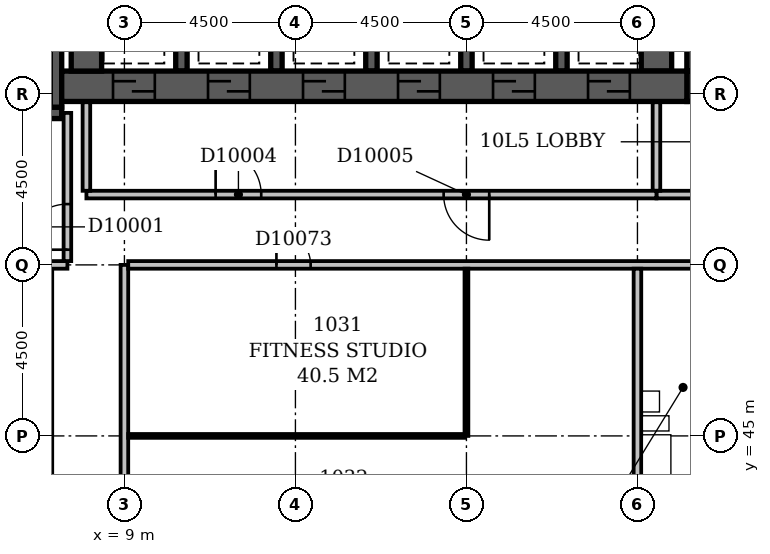
"""IFC4 building model, lengths in metres.
Left out: names, types, materials, properties, quantities, classifications, styles, units other than length and angle.
Written with IfcOpenShell. Run it as: python <this file> out.ifc"""

import sys

from ifc_helpers import new_model, si_unit, direction, frame, frame_2d, origin, place, context, subcontext, project, spatial, rectangle, extrude, element, fill, save


model = new_model("IFC4")
c1 = context("Model", 3, precision=1e-05, world=origin(), true_north=direction((0.0, 1.0)))
c2 = subcontext(c1, "Body", "Model", "MODEL_VIEW")
j1 = project(units=[si_unit("LENGTHUNIT", "METRE"), si_unit("PLANEANGLEUNIT", "RADIAN")], contexts=[c1])
p1 = place(None, origin())
s1 = spatial("IfcSite", under=j1, at=p1, CompositionType="ELEMENT")
p2 = place(p1, origin())
s2 = spatial("IfcBuilding", under=s1, at=p2, CompositionType="ELEMENT")
p3 = place(p2, frame((0.0, 0.0, 47.0)))
s3 = spatial("IfcBuildingStorey", under=s2, at=p3, CompositionType="ELEMENT", Elevation=47.0)
p4 = place(p3, frame((0.35, 53.5, -0.3), z_axis=(0.0, 0.0, 1.0), x_axis=(1.0, 0.0, 0.0)))
e1 = element("IfcWall", 1, at=p4, inside=s3, PredefinedType="SHEAR", context=c2, shape_type="SweptSolid", body=[
    extrude(rectangle(XDim=7.0, YDim=0.3, at=frame_2d((3.5, 0.0))), origin(), (0.0, 0.0, 1.0), 3.6),
])
p5 = place(p4, frame((5.58, 0.0, 0.3)))
e2 = element("IfcOpeningElement", 2, at=p5, cuts=e1, PredefinedType="OPENING", context=c2, shape_type="SweptSolid", body=[
    extrude(rectangle(XDim=1.1, YDim=2.1, at=frame_2d((0.55, 1.05))), frame((0.0, 0.162, 0.0), z_axis=(0.0, -1.0, 0.0), x_axis=(1.0, 0.0, 0.0)), (0.0, 0.0, 1.0), 0.324),
])
p6 = place(p3, frame((7.2, 53.65, -0.3), z_axis=(0.0, 0.0, 1.0), x_axis=(0.0, 1.0, 0.0)))
e3 = element("IfcWall", 3, at=p6, inside=s3, PredefinedType="SHEAR", context=c2, shape_type="SweptSolid", body=[
    extrude(rectangle(XDim=4.2, YDim=0.3, at=frame_2d((2.1, 0.0))), origin(), (0.0, 0.0, 1.0), 3.6),
])
p7 = place(p3, frame((7.35, 54.2, -0.3), z_axis=(0.0, 0.0, 1.0), x_axis=(1.0, 0.0, 0.0)))
e4 = element("IfcWall", 4, at=p7, inside=s3, PredefinedType="SHEAR", context=c2, shape_type="SweptSolid", body=[
    extrude(rectangle(XDim=16.45, YDim=0.8, at=frame_2d((8.225, 0.0))), origin(), (0.0, 0.0, 1.0), 3.6),
])
p8 = place(p7, frame((1.35, 0.0, 0.3)))
e5 = element("IfcOpeningElement", 5, at=p8, cuts=e4, PredefinedType="OPENING", context=c2, shape_type="SweptSolid", body=[
    extrude(rectangle(XDim=1.1, YDim=2.1, at=frame_2d((0.55, 1.05))), frame((0.0, 0.412, 0.0), z_axis=(0.0, -1.0, 0.0), x_axis=(1.0, 0.0, 0.0)), (0.0, 0.0, 1.0), 0.824),
])
p9 = place(p7, frame((3.85, 0.0, 0.3)))
e6 = element("IfcOpeningElement", 6, at=p9, cuts=e4, PredefinedType="OPENING", context=c2, shape_type="SweptSolid", body=[
    extrude(rectangle(XDim=1.1, YDim=2.1, at=frame_2d((0.55, 1.05))), frame((0.0, 0.412, 0.0), z_axis=(0.0, -1.0, 0.0), x_axis=(1.0, 0.0, 0.0)), (0.0, 0.0, 1.0), 0.824),
])
p10 = place(p7, frame((6.35, 0.0, 0.3)))
e7 = element("IfcOpeningElement", 7, at=p10, cuts=e4, PredefinedType="OPENING", context=c2, shape_type="SweptSolid", body=[
    extrude(rectangle(XDim=1.1, YDim=2.1, at=frame_2d((0.55, 1.05))), frame((0.0, 0.412, 0.0), z_axis=(0.0, -1.0, 0.0), x_axis=(1.0, 0.0, 0.0)), (0.0, 0.0, 1.0), 0.824),
])
p11 = place(p7, frame((8.85, 0.0, 0.3)))
e8 = element("IfcOpeningElement", 8, at=p11, cuts=e4, PredefinedType="OPENING", context=c2, shape_type="SweptSolid", body=[
    extrude(rectangle(XDim=1.1, YDim=2.1, at=frame_2d((0.55, 1.05))), frame((0.0, 0.412, 0.0), z_axis=(0.0, -1.0, 0.0), x_axis=(1.0, 0.0, 0.0)), (0.0, 0.0, 1.0), 0.824),
])
p12 = place(p7, frame((11.35, 0.0, 0.3)))
e9 = element("IfcOpeningElement", 9, at=p12, cuts=e4, PredefinedType="OPENING", context=c2, shape_type="SweptSolid", body=[
    extrude(rectangle(XDim=1.1, YDim=2.1, at=frame_2d((0.55, 1.05))), frame((0.0, 0.412, 0.0), z_axis=(0.0, -1.0, 0.0), x_axis=(1.0, 0.0, 0.0)), (0.0, 0.0, 1.0), 0.824),
])
p13 = place(p7, frame((13.85, 0.0, 0.3)))
e10 = element("IfcOpeningElement", 10, at=p13, cuts=e4, PredefinedType="OPENING", context=c2, shape_type="SweptSolid", body=[
    extrude(rectangle(XDim=1.1, YDim=2.1, at=frame_2d((0.55, 1.05))), frame((0.0, 0.412, 0.0), z_axis=(0.0, -1.0, 0.0), x_axis=(1.0, 0.0, 0.0)), (0.0, 0.0, 1.0), 0.824),
])
p14 = place(p3, frame((8.0, 54.6, -0.3), z_axis=(0.0, 0.0, 1.0), x_axis=(0.0, 1.0, 0.0)))
e11 = element("IfcWall", 11, at=p14, inside=s3, PredefinedType="SHEAR", context=c2, shape_type="SweptSolid", body=[
    extrude(rectangle(XDim=3.0, YDim=0.8, at=frame_2d((1.5, 0.0))), origin(), (0.0, 0.0, 1.0), 3.6),
])
for number, where, z_axis, x_axis in (
    (12, (10.5, 54.6, -0.3), (0.0, 0.0, 1.0), (0.0, 1.0, 0.0)),
    (13, (13.0, 54.6, -0.3), (0.0, 0.0, 1.0), (0.0, 1.0, 0.0)),
    (14, (15.5, 54.6, -0.3), (0.0, 0.0, 1.0), (0.0, 1.0, 0.0)),
    (15, (18.0, 54.6, -0.3), (0.0, 0.0, 1.0), (0.0, 1.0, 0.0)),
    (16, (20.5, 54.6, -0.3), (0.0, 0.0, 1.0), (0.0, 1.0, 0.0)),
):
    element("IfcWall", number, at=place(p3, frame(where, z_axis=z_axis, x_axis=x_axis)), inside=s3, PredefinedType="SHEAR", context=c2, shape_type="SweptSolid", body=[
        extrude(rectangle(XDim=3.0, YDim=0.3, at=frame_2d((1.5, 0.0))), origin(), (0.0, 0.0, 1.0), 3.6),
    ])
p15 = place(p3, frame((23.0, 54.6, -0.3), z_axis=(0.0, 0.0, 1.0), x_axis=(0.0, 1.0, 0.0)))
e17 = element("IfcWall", 17, at=p15, inside=s3, PredefinedType="SHEAR", context=c2, shape_type="SweptSolid", body=[
    extrude(rectangle(XDim=3.0, YDim=0.8, at=frame_2d((1.5, 0.0))), origin(), (0.0, 0.0, 1.0), 3.6),
])
p16 = place(p3, frame((23.8, 54.2, -0.3), z_axis=(0.0, 0.0, 1.0), x_axis=(1.0, 0.0, 0.0)))
e18 = element("IfcWall", 18, at=p16, inside=s3, PredefinedType="SHEAR", context=c2, shape_type="SweptSolid", body=[
    extrude(rectangle(XDim=3.3, YDim=0.8, at=frame_2d((1.65, 0.0))), origin(), (0.0, 0.0, 1.0), 3.6),
])
p17 = place(p16, frame((1.1, 0.0, 0.3)))
e19 = element("IfcOpeningElement", 19, at=p17, cuts=e18, PredefinedType="OPENING", context=c2, shape_type="SweptSolid", body=[
    extrude(rectangle(XDim=1.1, YDim=2.1, at=frame_2d((0.55, 1.05))), frame((0.0, 0.412, 0.0), z_axis=(0.0, -1.0, 0.0), x_axis=(1.0, 0.0, 0.0)), (0.0, 0.0, 1.0), 0.824),
])
p18 = place(p3, frame((24.2, 54.6, -0.3), z_axis=(0.0, 0.0, 1.0), x_axis=(0.0, 1.0, 0.0)))
e20 = element("IfcWall", 20, at=p18, inside=s3, PredefinedType="SHEAR", context=c2, shape_type="SweptSolid", body=[
    extrude(rectangle(XDim=3.0, YDim=0.8, at=frame_2d((1.5, 0.0))), origin(), (0.0, 0.0, 1.0), 3.6),
])
p19 = place(p3, frame((8.0, 51.35, 0.0), z_axis=(0.0, 0.0, 1.0), x_axis=(1.0, 0.0, 0.0)))
e21 = element("IfcWall", 21, at=p19, inside=s3, PredefinedType="PARTITIONING", context=c2, shape_type="SweptSolid", body=[
    extrude(rectangle(XDim=15.0, YDim=0.2, at=frame_2d((7.5, 0.0))), origin(), (0.0, 0.0, 1.0), 3.3),
])
p20 = place(p19, frame((3.4, 0.0, 0.0)))
e22 = element("IfcOpeningElement", 22, at=p20, cuts=e21, PredefinedType="OPENING", context=c2, shape_type="SweptSolid", body=[
    extrude(rectangle(XDim=1.2, YDim=2.1, at=frame_2d((0.6, 1.05))), frame((0.0, 0.112, 0.0), z_axis=(0.0, -1.0, 0.0), x_axis=(1.0, 0.0, 0.0)), (0.0, 0.0, 1.0), 0.224),
])
p21 = place(p19, frame((9.4, 0.0, 0.0)))
e23 = element("IfcOpeningElement", 23, at=p21, cuts=e21, PredefinedType="OPENING", context=c2, shape_type="SweptSolid", body=[
    extrude(rectangle(XDim=1.2, YDim=2.1, at=frame_2d((0.6, 1.05))), frame((0.0, 0.112, 0.0), z_axis=(0.0, -1.0, 0.0), x_axis=(1.0, 0.0, 0.0)), (0.0, 0.0, 1.0), 0.224),
])
for number, where, z_axis, x_axis in (
    (24, (23.0, 51.45, 0.0), (0.0, 0.0, 1.0), (0.0, 1.0, 0.0)),
    (25, (8.0, 51.45, 0.0), (0.0, 0.0, 1.0), (0.0, 1.0, 0.0)),
):
    element("IfcWall", number, at=place(p3, frame(where, z_axis=z_axis, x_axis=x_axis)), inside=s3, PredefinedType="PARTITIONING", context=c2, shape_type="SweptSolid", body=[
        extrude(rectangle(XDim=2.33, YDim=0.2, at=frame_2d((1.165, 0.0))), origin(), (0.0, 0.0, 1.0), 3.3),
    ])
p22 = place(p3, frame((23.0, 51.35, 0.0), z_axis=(0.0, 0.0, 1.0), x_axis=(1.0, 0.0, 0.0)))
e26 = element("IfcWall", 26, at=p22, inside=s3, PredefinedType="PARTITIONING", context=c2, shape_type="SweptSolid", body=[
    extrude(rectangle(XDim=4.8, YDim=0.2, at=frame_2d((2.4, 0.0))), origin(), (0.0, 0.0, 1.0), 3.3),
])
p23 = place(p22, frame((1.65, 0.0, 0.0)))
e27 = element("IfcOpeningElement", 27, at=p23, cuts=e26, PredefinedType="OPENING", context=c2, shape_type="SweptSolid", body=[
    extrude(rectangle(XDim=1.2, YDim=2.1, at=frame_2d((0.6, 1.05))), frame((0.0, 0.112, 0.0), z_axis=(0.0, -1.0, 0.0), x_axis=(1.0, 0.0, 0.0)), (0.0, 0.0, 1.0), 0.224),
])
p24 = place(p3, frame((0.5, 49.5, 0.0), z_axis=(0.0, 0.0, 1.0), x_axis=(1.0, 0.0, 0.0)))
e28 = element("IfcWall", 28, at=p24, inside=s3, PredefinedType="PARTITIONING", context=c2, shape_type="SweptSolid", body=[
    extrude(rectangle(XDim=7.0, YDim=0.2, at=frame_2d((3.5, 0.0))), origin(), (0.0, 0.0, 1.0), 3.3),
])
p25 = place(p3, frame((7.5, 49.6, 0.0), z_axis=(0.0, 0.0, 1.0), x_axis=(0.0, 1.0, 0.0)))
e29 = element("IfcWall", 29, at=p25, inside=s3, PredefinedType="PARTITIONING", context=c2, shape_type="SweptSolid", body=[
    extrude(rectangle(XDim=3.9, YDim=0.2, at=frame_2d((1.95, 0.0))), origin(), (0.0, 0.0, 1.0), 3.3),
])
p26 = place(p25, frame((0.3, 0.0, 0.0)))
e30 = element("IfcOpeningElement", 30, at=p26, cuts=e29, PredefinedType="OPENING", context=c2, shape_type="SweptSolid", body=[
    extrude(rectangle(XDim=1.2, YDim=2.1, at=frame_2d((0.6, 1.05))), frame((0.0, 0.112, 0.0), z_axis=(0.0, -1.0, 0.0), x_axis=(1.0, 0.0, 0.0)), (0.0, 0.0, 1.0), 0.224),
])
p27 = place(p3, frame((9.0, 5.0, 0.0), z_axis=(0.0, 0.0, 1.0), x_axis=(0.0, 1.0, 0.0)))
e31 = element("IfcWall", 31, at=p27, inside=s3, PredefinedType="PARTITIONING", context=c2, shape_type="SweptSolid", body=[
    extrude(rectangle(XDim=44.5, YDim=0.2, at=frame_2d((22.25, 0.0))), origin(), (0.0, 0.0, 1.0), 3.3),
])
p28 = place(p27, frame((28.45, 0.0, 0.0)))
e32 = element("IfcOpeningElement", 32, at=p28, cuts=e31, PredefinedType="OPENING", context=c2, shape_type="SweptSolid", body=[
    extrude(rectangle(XDim=1.0, YDim=2.1, at=frame_2d((0.5, 1.05))), frame((0.0, 0.112, 0.0), z_axis=(0.0, -1.0, 0.0), x_axis=(1.0, 0.0, 0.0)), (0.0, 0.0, 1.0), 0.224),
])
p29 = place(p27, frame((17.8, 0.0, 0.0)))
e33 = element("IfcOpeningElement", 33, at=p29, cuts=e31, PredefinedType="OPENING", context=c2, shape_type="SweptSolid", body=[
    extrude(rectangle(XDim=1.0, YDim=2.1, at=frame_2d((0.5, 1.05))), frame((0.0, 0.112, 0.0), z_axis=(0.0, -1.0, 0.0), x_axis=(1.0, 0.0, 0.0)), (0.0, 0.0, 1.0), 0.224),
])
p30 = place(p27, frame((14.55, 0.0, 0.0)))
e34 = element("IfcOpeningElement", 34, at=p30, cuts=e31, PredefinedType="OPENING", context=c2, shape_type="SweptSolid", body=[
    extrude(rectangle(XDim=1.0, YDim=2.1, at=frame_2d((0.5, 1.05))), frame((0.0, 0.112, 0.0), z_axis=(0.0, -1.0, 0.0), x_axis=(1.0, 0.0, 0.0)), (0.0, 0.0, 1.0), 0.224),
])
p31 = place(p27, frame((11.7, 0.0, 0.0)))
e35 = element("IfcOpeningElement", 35, at=p31, cuts=e31, PredefinedType="OPENING", context=c2, shape_type="SweptSolid", body=[
    extrude(rectangle(XDim=1.0, YDim=2.1, at=frame_2d((0.5, 1.05))), frame((0.0, 0.112, 0.0), z_axis=(0.0, -1.0, 0.0), x_axis=(1.0, 0.0, 0.0)), (0.0, 0.0, 1.0), 0.224),
])
p32 = place(p27, frame((35.0, 0.0, 0.0)))
e36 = element("IfcOpeningElement", 36, at=p32, cuts=e31, PredefinedType="OPENING", context=c2, shape_type="SweptSolid", body=[
    extrude(rectangle(XDim=0.9, YDim=2.1, at=frame_2d((0.45, 1.05))), frame((0.0, 0.112, 0.0), z_axis=(0.0, -1.0, 0.0), x_axis=(1.0, 0.0, 0.0)), (0.0, 0.0, 1.0), 0.224),
])
p33 = place(p27, frame((1.5, 0.0, 0.0)))
e37 = element("IfcOpeningElement", 37, at=p33, cuts=e31, PredefinedType="OPENING", context=c2, shape_type="SweptSolid", body=[
    extrude(rectangle(XDim=0.9, YDim=2.1, at=frame_2d((0.45, 1.05))), frame((0.0, 0.112, 0.0), z_axis=(0.0, -1.0, 0.0), x_axis=(1.0, 0.0, 0.0)), (0.0, 0.0, 1.0), 0.224),
])
p34 = place(p3, frame((22.5, 36.6, 0.0), z_axis=(0.0, 0.0, 1.0), x_axis=(0.0, 1.0, 0.0)))
e38 = element("IfcWall", 38, at=p34, inside=s3, PredefinedType="PARTITIONING", context=c2, shape_type="SweptSolid", body=[
    extrude(rectangle(XDim=12.8, YDim=0.2, at=frame_2d((6.4, 0.0))), origin(), (0.0, 0.0, 1.0), 3.3),
])
p35 = place(p3, frame((9.1, 45.0, 0.0), z_axis=(0.0, 0.0, 1.0), x_axis=(1.0, 0.0, 0.0)))
e39 = element("IfcWall", 39, at=p35, inside=s3, PredefinedType="PARTITIONING", context=c2, shape_type="SweptSolid", body=[
    extrude(rectangle(XDim=8.85, YDim=0.1, at=frame_2d((4.425, 0.0))), origin(), (0.0, 0.0, 1.0), 3.3),
])
p36 = place(p3, frame((18.0, 45.0, 0.0), z_axis=(0.0, 0.0, 1.0), x_axis=(0.0, 1.0, 0.0)))
e40 = element("IfcWall", 40, at=p36, inside=s3, PredefinedType="PARTITIONING", context=c2, shape_type="SweptSolid", body=[
    extrude(rectangle(XDim=4.4, YDim=0.1, at=frame_2d((2.2, 0.0))), origin(), (0.0, 0.0, 1.0), 3.3),
])
p37 = place(p3, frame((9.1, 49.5, 0.0), z_axis=(0.0, 0.0, 1.0), x_axis=(1.0, 0.0, 0.0)))
e41 = element("IfcWall", 41, at=p37, inside=s3, PredefinedType="PARTITIONING", context=c2, shape_type="SweptSolid", body=[
    extrude(rectangle(XDim=57.8, YDim=0.2, at=frame_2d((28.9, 0.0))), origin(), (0.0, 0.0, 1.0), 3.3),
])
p38 = place(p37, frame((16.1, 0.0, 0.0)))
e42 = element("IfcOpeningElement", 42, at=p38, cuts=e41, PredefinedType="OPENING", context=c2, shape_type="SweptSolid", body=[
    extrude(rectangle(XDim=1.0, YDim=2.1, at=frame_2d((0.5, 1.05))), frame((0.0, 0.112, 0.0), z_axis=(0.0, -1.0, 0.0), x_axis=(1.0, 0.0, 0.0)), (0.0, 0.0, 1.0), 0.224),
])
p39 = place(p37, frame((40.0, 0.0, 0.0)))
e43 = element("IfcOpeningElement", 43, at=p39, cuts=e41, PredefinedType="OPENING", context=c2, shape_type="SweptSolid", body=[
    extrude(rectangle(XDim=1.0, YDim=2.1, at=frame_2d((0.5, 1.05))), frame((0.0, 0.112, 0.0), z_axis=(0.0, -1.0, 0.0), x_axis=(1.0, 0.0, 0.0)), (0.0, 0.0, 1.0), 0.224),
])
p40 = place(p37, frame((45.2, 0.0, 0.0)))
e44 = element("IfcOpeningElement", 44, at=p40, cuts=e41, PredefinedType="OPENING", context=c2, shape_type="SweptSolid", body=[
    extrude(rectangle(XDim=1.0, YDim=2.1, at=frame_2d((0.5, 1.05))), frame((0.0, 0.112, 0.0), z_axis=(0.0, -1.0, 0.0), x_axis=(1.0, 0.0, 0.0)), (0.0, 0.0, 1.0), 0.224),
])
p41 = place(p37, frame((3.9, 0.0, 0.0)))
e45 = element("IfcOpeningElement", 45, at=p41, cuts=e41, PredefinedType="OPENING", context=c2, shape_type="SweptSolid", body=[
    extrude(rectangle(XDim=0.9, YDim=2.1, at=frame_2d((0.45, 1.05))), frame((0.0, 0.112, 0.0), z_axis=(0.0, -1.0, 0.0), x_axis=(1.0, 0.0, 0.0)), (0.0, 0.0, 1.0), 0.224),
])
p42 = place(p26, origin())
e46 = element("IfcDoor", 46, at=p42, inside=s3, OperationType="SINGLE_SWING_LEFT", PredefinedType="DOOR", context=c2, shape_type="SweptSolid", body=[
    extrude(rectangle(XDim=1.2, YDim=2.1, at=frame_2d((0.6, 1.05))), frame((0.0, 0.025, 0.0), z_axis=(0.0, -1.0, 0.0), x_axis=(1.0, 0.0, 0.0)), (0.0, 0.0, 1.0), 0.05),
])
fill(e30, e46)
p43 = place(p8, origin())
e47 = element("IfcDoor", 47, at=p43, inside=s3, OperationType="SLIDING_TO_LEFT", PredefinedType="DOOR", context=c2, shape_type="SweptSolid", body=[
    extrude(rectangle(XDim=1.1, YDim=2.1, at=frame_2d((0.55, 1.05))), frame((0.0, 0.025, 0.0), z_axis=(0.0, -1.0, 0.0), x_axis=(1.0, 0.0, 0.0)), (0.0, 0.0, 1.0), 0.05),
])
fill(e5, e47)
p44 = place(p9, origin())
e48 = element("IfcDoor", 48, at=p44, inside=s3, OperationType="SLIDING_TO_LEFT", PredefinedType="DOOR", context=c2, shape_type="SweptSolid", body=[
    extrude(rectangle(XDim=1.1, YDim=2.1, at=frame_2d((0.55, 1.05))), frame((0.0, 0.025, 0.0), z_axis=(0.0, -1.0, 0.0), x_axis=(1.0, 0.0, 0.0)), (0.0, 0.0, 1.0), 0.05),
])
fill(e6, e48)
p45 = place(p10, origin())
e49 = element("IfcDoor", 49, at=p45, inside=s3, OperationType="SLIDING_TO_LEFT", PredefinedType="DOOR", context=c2, shape_type="SweptSolid", body=[
    extrude(rectangle(XDim=1.1, YDim=2.1, at=frame_2d((0.55, 1.05))), frame((0.0, 0.025, 0.0), z_axis=(0.0, -1.0, 0.0), x_axis=(1.0, 0.0, 0.0)), (0.0, 0.0, 1.0), 0.05),
])
fill(e7, e49)
p46 = place(p11, origin())
e50 = element("IfcDoor", 50, at=p46, inside=s3, OperationType="SLIDING_TO_LEFT", PredefinedType="DOOR", context=c2, shape_type="SweptSolid", body=[
    extrude(rectangle(XDim=1.1, YDim=2.1, at=frame_2d((0.55, 1.05))), frame((0.0, 0.025, 0.0), z_axis=(0.0, -1.0, 0.0), x_axis=(1.0, 0.0, 0.0)), (0.0, 0.0, 1.0), 0.05),
])
fill(e8, e50)
p47 = place(p12, origin())
e51 = element("IfcDoor", 51, at=p47, inside=s3, OperationType="SLIDING_TO_LEFT", PredefinedType="DOOR", context=c2, shape_type="SweptSolid", body=[
    extrude(rectangle(XDim=1.1, YDim=2.1, at=frame_2d((0.55, 1.05))), frame((0.0, 0.025, 0.0), z_axis=(0.0, -1.0, 0.0), x_axis=(1.0, 0.0, 0.0)), (0.0, 0.0, 1.0), 0.05),
])
fill(e9, e51)
p48 = place(p13, origin())
e52 = element("IfcDoor", 52, at=p48, inside=s3, OperationType="SLIDING_TO_LEFT", PredefinedType="DOOR", context=c2, shape_type="SweptSolid", body=[
    extrude(rectangle(XDim=1.1, YDim=2.1, at=frame_2d((0.55, 1.05))), frame((0.0, 0.025, 0.0), z_axis=(0.0, -1.0, 0.0), x_axis=(1.0, 0.0, 0.0)), (0.0, 0.0, 1.0), 0.05),
])
fill(e10, e52)
p49 = place(p20, origin())
e53 = element("IfcDoor", 53, at=p49, inside=s3, OperationType="SINGLE_SWING_LEFT", PredefinedType="DOOR", context=c2, shape_type="SweptSolid", body=[
    extrude(rectangle(XDim=1.2, YDim=2.1, at=frame_2d((0.6, 1.05))), frame((0.0, 0.025, 0.0), z_axis=(0.0, -1.0, 0.0), x_axis=(1.0, 0.0, 0.0)), (0.0, 0.0, 1.0), 0.05),
])
fill(e22, e53)
p50 = place(p21, origin())
e54 = element("IfcDoor", 54, at=p50, inside=s3, OperationType="SINGLE_SWING_RIGHT", PredefinedType="DOOR", context=c2, shape_type="SweptSolid", body=[
    extrude(rectangle(XDim=1.2, YDim=2.1, at=frame_2d((0.6, 1.05))), frame((0.0, 0.025, 0.0), z_axis=(0.0, -1.0, 0.0), x_axis=(1.0, 0.0, 0.0)), (0.0, 0.0, 1.0), 0.05),
])
fill(e23, e54)
p51 = place(p41, origin())
e55 = element("IfcDoor", 55, at=p51, inside=s3, OperationType="SINGLE_SWING_LEFT", PredefinedType="DOOR", context=c2, shape_type="SweptSolid", body=[
    extrude(rectangle(XDim=0.9, YDim=2.1, at=frame_2d((0.45, 1.05))), frame((0.0, 0.025, 0.0), z_axis=(0.0, -1.0, 0.0), x_axis=(1.0, 0.0, 0.0)), (0.0, 0.0, 1.0), 0.05),
])
fill(e45, e55)
save(model, sys.argv[1])
